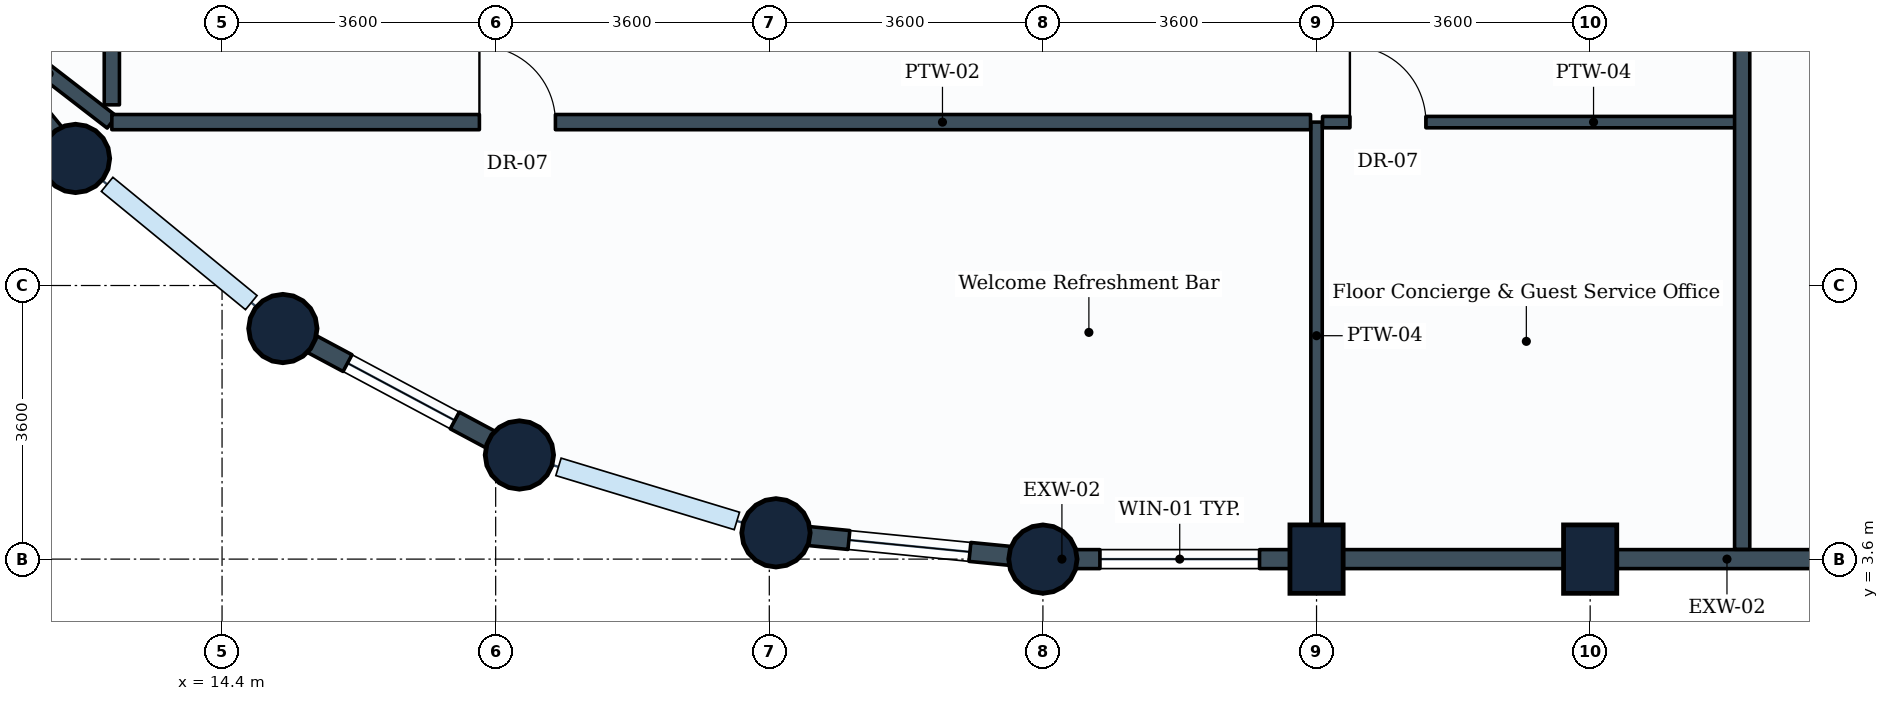
"""IFC4 building model, lengths in metres.
Left out: names, types, materials, properties, quantities, classifications, styles, units other than length and angle.
Written with IfcOpenShell. Run it as: python <this file> out.ifc"""

import sys

from ifc_helpers import new_model, si_unit, direction, frame, frame_2d, origin, origin_2d, place, context, subcontext, project, spatial, rectangle, circle, extrude, element, fill, save


model = new_model("IFC4")
c1 = context("Model", 3, precision=1e-05, world=origin(), true_north=direction((0.0, 1.0)))
c2 = subcontext(c1, "Body", "Model", "MODEL_VIEW")
j1 = project(units=[si_unit("LENGTHUNIT", "METRE"), si_unit("PLANEANGLEUNIT", "RADIAN")], contexts=[c1])
p1 = place(None, origin())
s1 = spatial("IfcSite", under=j1, at=p1, CompositionType="ELEMENT")
p2 = place(p1, origin())
s2 = spatial("IfcBuilding", under=s1, at=p2, CompositionType="ELEMENT")
p3 = place(p2, frame((0.0, 0.0, 217.4)))
s3 = spatial("IfcBuildingStorey", under=s2, at=p3, CompositionType="ELEMENT", Elevation=217.4)
for number, where, z_axis, x_axis in (
    (1, (12.472, 8.872, 0.0), (0.0, 0.0, 1.0), (1.0, 0.0, 0.0)),
    (2, (15.2, 6.634, 0.0), (0.0, 0.0, 1.0), (1.0, 0.0, 0.0)),
    (3, (18.312, 4.97, 0.0), (0.0, 0.0, 1.0), (1.0, 0.0, 0.0)),
    (4, (21.688, 3.946, 0.0), (0.0, 0.0, 1.0), (1.0, 0.0, 0.0)),
    (5, (25.2, 3.6, 0.0), (0.0, 0.0, 1.0), (1.0, 0.0, 0.0)),
):
    element("IfcColumn", number, at=place(p3, frame(where, z_axis=z_axis, x_axis=x_axis)), inside=s3, PredefinedType="COLUMN", context=c2, shape_type="SweptSolid", body=[
        extrude(circle(Radius=0.45, at=origin_2d()), origin(), (0.0, 0.0, 1.0), 3.6),
    ])
for number, where, z_axis, x_axis in (
    (6, (28.8, 3.6, 0.0), (0.0, 0.0, 1.0), (1.0, 0.0, 0.0)),
    (7, (32.4, 3.6, 0.0), (0.0, 0.0, 1.0), (1.0, 0.0, 0.0)),
):
    element("IfcColumn", number, at=place(p3, frame(where, z_axis=z_axis, x_axis=x_axis)), inside=s3, PredefinedType="COLUMN", context=c2, shape_type="SweptSolid", body=[
        extrude(rectangle(XDim=0.7, YDim=0.9, at=origin_2d()), origin(), (0.0, 0.0, 1.0), 3.6),
    ])
p4 = place(p3, frame((28.8, 3.6, 0.0), z_axis=(0.0, 0.0, 1.0), x_axis=(-1.0, 0.0, 0.0)))
e8 = element("IfcWall", 8, at=p4, inside=s3, PredefinedType="STANDARD", context=c2, shape_type="SweptSolid", body=[
    extrude(rectangle(XDim=3.6, YDim=0.25, at=frame_2d((1.8, 0.0))), origin(), (0.0, 0.0, 1.0), 2.83),
])
p5 = place(p4, frame((0.75, 0.0, 0.85)))
e9 = element("IfcOpeningElement", 9, at=p5, cuts=e8, PredefinedType="OPENING", context=c2, shape_type="SweptSolid", body=[
    extrude(rectangle(XDim=2.1, YDim=1.35, at=frame_2d((1.05, 0.675))), frame((0.0, 0.135, 0.0), z_axis=(0.0, -1.0, 0.0), x_axis=(1.0, 0.0, 0.0)), (0.0, 0.0, 1.0), 0.27),
])
p6 = place(p3, frame((32.4, 3.6, 0.0), z_axis=(0.0, 0.0, 1.0), x_axis=(-1.0, 0.0, 0.0)))
e10 = element("IfcWall", 10, at=p6, inside=s3, PredefinedType="STANDARD", context=c2, shape_type="SweptSolid", body=[
    extrude(rectangle(XDim=3.6, YDim=0.25, at=frame_2d((1.8, 0.0))), origin(), (0.0, 0.0, 1.0), 2.83),
])
p7 = place(p3, frame((36.0, 3.6, 0.0), z_axis=(0.0, 0.0, 1.0), x_axis=(-1.0, 0.0, 0.0)))
e11 = element("IfcWall", 11, at=p7, inside=s3, PredefinedType="STANDARD", context=c2, shape_type="SweptSolid", body=[
    extrude(rectangle(XDim=3.6, YDim=0.25, at=frame_2d((1.8, 0.0))), origin(), (0.0, 0.0, 1.0), 2.83),
])
p8 = place(p3, frame((12.472, 8.872, 0.0), z_axis=(0.0, 0.0, 1.0), x_axis=(-0.634258295121, 0.773121216285, 0.0)))
e12 = element("IfcWall", 12, at=p8, inside=s3, PredefinedType="STANDARD", context=c2, shape_type="SweptSolid", body=[
    extrude(rectangle(XDim=3.529, YDim=0.25, at=frame_2d((1.764, 0.0))), origin(), (0.0, 0.0, 1.0), 2.83),
])
p9 = place(p3, frame((18.312, 4.97, 0.0), z_axis=(0.0, 0.0, 1.0), x_axis=(-0.881846862014, 0.471535907389, 0.0)))
e13 = element("IfcWall", 13, at=p9, inside=s3, PredefinedType="STANDARD", context=c2, shape_type="SweptSolid", body=[
    extrude(rectangle(XDim=3.529, YDim=0.25, at=frame_2d((1.765, 0.0))), origin(), (0.0, 0.0, 1.0), 2.83),
])
p10 = place(p9, frame((0.964, 0.0, 0.85)))
e14 = element("IfcOpeningElement", 14, at=p10, cuts=e13, PredefinedType="OPENING", context=c2, shape_type="SweptSolid", body=[
    extrude(rectangle(XDim=1.6, YDim=1.35, at=frame_2d((0.8, 0.675))), frame((0.0, 0.135, 0.0), z_axis=(0.0, -1.0, 0.0), x_axis=(1.0, 0.0, 0.0)), (0.0, 0.0, 1.0), 0.27),
])
p11 = place(p3, frame((25.2, 3.6, 0.0), z_axis=(0.0, 0.0, 1.0), x_axis=(-0.995183369056, 0.098030923459, 0.0)))
e15 = element("IfcWall", 15, at=p11, inside=s3, PredefinedType="STANDARD", context=c2, shape_type="SweptSolid", body=[
    extrude(rectangle(XDim=3.529, YDim=0.25, at=frame_2d((1.765, 0.0))), origin(), (0.0, 0.0, 1.0), 2.83),
])
p12 = place(p11, frame((0.965, 0.0, 0.85)))
e16 = element("IfcOpeningElement", 16, at=p12, cuts=e15, PredefinedType="OPENING", context=c2, shape_type="SweptSolid", body=[
    extrude(rectangle(XDim=1.6, YDim=1.35, at=frame_2d((0.8, 0.675))), frame((0.0, 0.135, 0.0), z_axis=(0.0, -1.0, 0.0), x_axis=(1.0, 0.0, 0.0)), (0.0, 0.0, 1.0), 0.27),
])
p13 = place(p3, frame((28.8, 9.35, 0.0), z_axis=(0.0, 0.0, 1.0), x_axis=(0.0, -1.0, 0.0)))
e17 = element("IfcWall", 17, at=p13, inside=s3, PredefinedType="PARTITIONING", context=c2, shape_type="SweptSolid", body=[
    extrude(rectangle(XDim=5.621, YDim=0.15, at=frame_2d((2.811, 0.0))), origin(), (0.0, 0.0, 1.0), 3.265),
])
p14 = place(p3, frame((12.95, 9.35, 0.0), z_axis=(0.0, 0.0, 1.0), x_axis=(-0.791573423038, 0.611074067474, 0.0)))
e18 = element("IfcWall", 18, at=p14, inside=s3, PredefinedType="PARTITIONING", context=c2, shape_type="SweptSolid", body=[
    extrude(rectangle(XDim=2.084, YDim=0.2, at=frame_2d((1.042, 0.0))), origin(), (0.0, 0.0, 1.0), 2.83),
])
p15 = place(p3, frame((12.95, 9.577, 0.0), z_axis=(0.0, 0.0, 1.0), x_axis=(0.0, 1.0, 0.0)))
e19 = element("IfcWall", 19, at=p15, inside=s3, PredefinedType="PARTITIONING", context=c2, shape_type="SweptSolid", body=[
    extrude(rectangle(XDim=6.598, YDim=0.2, at=frame_2d((3.299, 0.0))), origin(), (0.0, 0.0, 1.0), 2.95),
])
p16 = place(p15, frame((4.004, 0.0, 0.0)))
e20 = element("IfcOpeningElement", 20, at=p16, cuts=e19, PredefinedType="OPENING", context=c2, shape_type="SweptSolid", body=[
    extrude(rectangle(XDim=1.0, YDim=2.1, at=frame_2d((0.5, 1.05))), frame((0.0, 0.11, 0.0), z_axis=(0.0, -1.0, 0.0), x_axis=(1.0, 0.0, 0.0)), (0.0, 0.0, 1.0), 0.22),
])
p17 = place(p3, frame((12.95, 9.35, 0.0), z_axis=(0.0, 0.0, 1.0), x_axis=(1.0, 0.0, 0.0)))
e21 = element("IfcWall", 21, at=p17, inside=s3, PredefinedType="PARTITIONING", context=c2, shape_type="SweptSolid", body=[
    extrude(rectangle(XDim=15.771, YDim=0.2, at=frame_2d((7.885, 0.0))), origin(), (0.0, 0.0, 1.0), 2.95),
])
p18 = place(p17, frame((4.836, 0.0, 0.0)))
e22 = element("IfcOpeningElement", 22, at=p18, cuts=e21, PredefinedType="OPENING", context=c2, shape_type="SweptSolid", body=[
    extrude(rectangle(XDim=1.0, YDim=2.1, at=frame_2d((0.5, 1.05))), frame((0.0, 0.11, 0.0), z_axis=(0.0, -1.0, 0.0), x_axis=(1.0, 0.0, 0.0)), (0.0, 0.0, 1.0), 0.22),
])
p19 = place(p3, frame((28.879, 9.35, 0.0), z_axis=(0.0, 0.0, 1.0), x_axis=(1.0, 0.0, 0.0)))
e23 = element("IfcWall", 23, at=p19, inside=s3, PredefinedType="PARTITIONING", context=c2, shape_type="SweptSolid", body=[
    extrude(rectangle(XDim=5.521, YDim=0.15, at=frame_2d((2.76, 0.0))), origin(), (0.0, 0.0, 1.0), 3.265),
])
p20 = place(p19, frame((0.36, 0.0, 0.0)))
e24 = element("IfcOpeningElement", 24, at=p20, cuts=e23, PredefinedType="OPENING", context=c2, shape_type="SweptSolid", body=[
    extrude(rectangle(XDim=1.0, YDim=2.1, at=frame_2d((0.5, 1.05))), frame((0.0, 0.085, 0.0), z_axis=(0.0, -1.0, 0.0), x_axis=(1.0, 0.0, 0.0)), (0.0, 0.0, 1.0), 0.17),
])
p21 = place(p3, frame((34.4, 3.729, 0.0), z_axis=(0.0, 0.0, 1.0), x_axis=(0.0, 1.0, 0.0)))
e25 = element("IfcWall", 25, at=p21, inside=s3, PredefinedType="PARTITIONING", context=c2, shape_type="SweptSolid", body=[
    extrude(rectangle(XDim=14.121, YDim=0.2, at=frame_2d((7.061, 0.0))), origin(), (0.0, 0.0, 1.0), 2.23),
])
p22 = place(p5, origin())
e26 = element("IfcWindow", 26, at=p22, inside=s3, PartitioningType="SINGLE_PANEL", PredefinedType="WINDOW", context=c2, shape_type="SweptSolid", body=[
    extrude(rectangle(XDim=2.1, YDim=1.35, at=frame_2d((1.05, 0.675))), frame((0.0, 0.03, 0.0), z_axis=(0.0, -1.0, 0.0), x_axis=(1.0, 0.0, 0.0)), (0.0, 0.0, 1.0), 0.06),
])
fill(e9, e26)
p23 = place(p10, origin())
e27 = element("IfcWindow", 27, at=p23, inside=s3, PartitioningType="SINGLE_PANEL", PredefinedType="WINDOW", context=c2, shape_type="SweptSolid", body=[
    extrude(rectangle(XDim=1.6, YDim=1.35, at=frame_2d((0.8, 0.675))), frame((0.0, 0.03, 0.0), z_axis=(0.0, -1.0, 0.0), x_axis=(1.0, 0.0, 0.0)), (0.0, 0.0, 1.0), 0.06),
])
fill(e14, e27)
p24 = place(p12, origin())
e28 = element("IfcWindow", 28, at=p24, inside=s3, PartitioningType="SINGLE_PANEL", PredefinedType="WINDOW", context=c2, shape_type="SweptSolid", body=[
    extrude(rectangle(XDim=1.6, YDim=1.35, at=frame_2d((0.8, 0.675))), frame((0.0, 0.03, 0.0), z_axis=(0.0, -1.0, 0.0), x_axis=(1.0, 0.0, 0.0)), (0.0, 0.0, 1.0), 0.06),
])
fill(e16, e28)
p25 = place(p18, origin())
e29 = element("IfcDoor", 29, at=p25, inside=s3, OperationType="SINGLE_SWING_LEFT", PredefinedType="DOOR", context=c2, shape_type="SweptSolid", body=[
    extrude(rectangle(XDim=1.0, YDim=2.1, at=frame_2d((0.5, 1.05))), frame((0.0, 0.025, 0.0), z_axis=(0.0, -1.0, 0.0), x_axis=(1.0, 0.0, 0.0)), (0.0, 0.0, 1.0), 0.05),
])
fill(e22, e29)
p26 = place(p20, origin())
e30 = element("IfcDoor", 30, at=p26, inside=s3, OperationType="SINGLE_SWING_LEFT", PredefinedType="DOOR", context=c2, shape_type="SweptSolid", body=[
    extrude(rectangle(XDim=1.0, YDim=2.1, at=frame_2d((0.5, 1.05))), frame((0.0, 0.025, 0.0), z_axis=(0.0, -1.0, 0.0), x_axis=(1.0, 0.0, 0.0)), (0.0, 0.0, 1.0), 0.05),
])
fill(e24, e30)
save(model, sys.argv[1])
